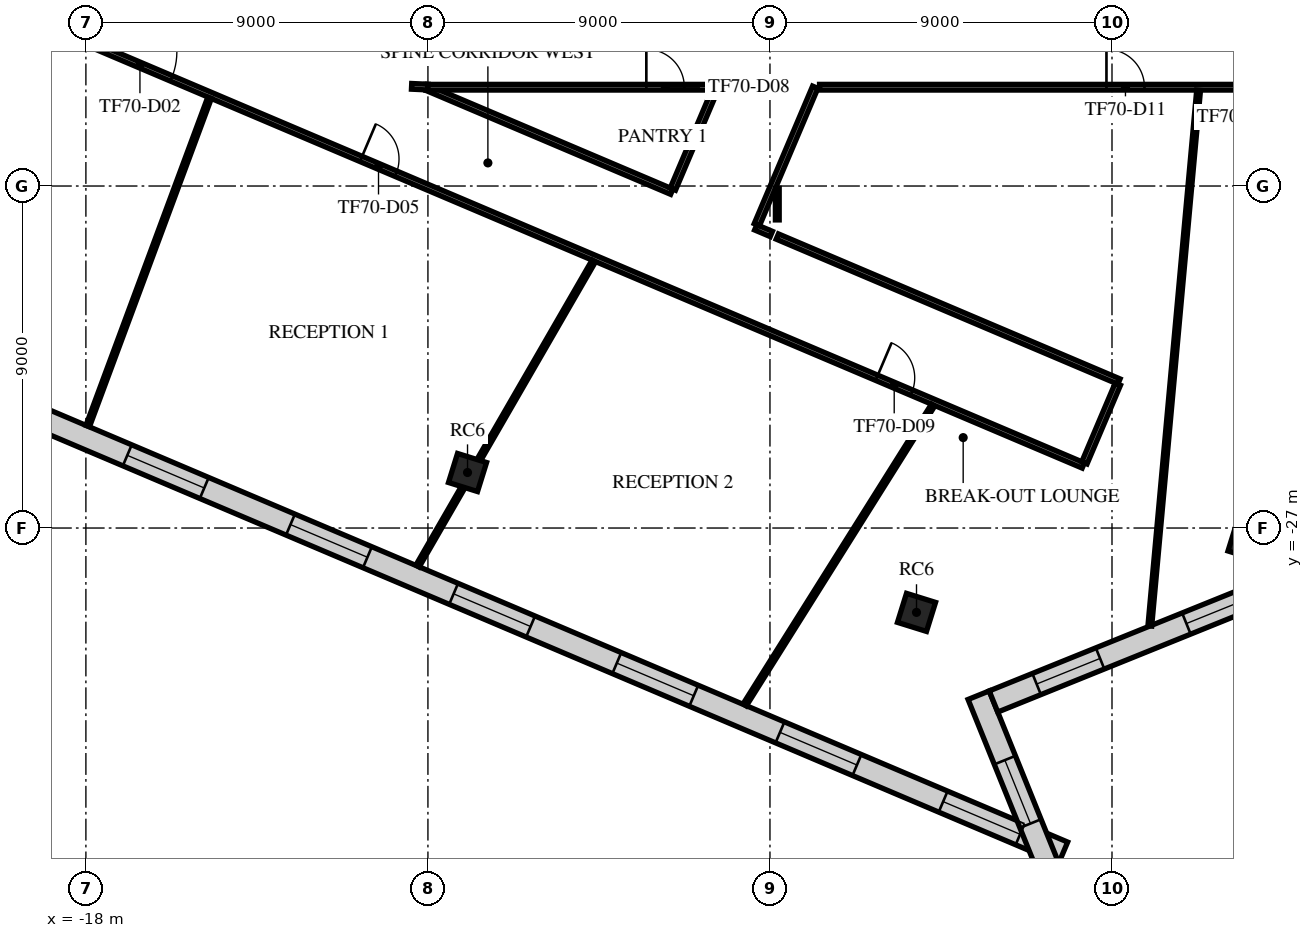
"""IFC4 building model, lengths in metres.
Left out: names, types, materials, properties, quantities, classifications, styles, units other than length and angle.
Written with IfcOpenShell. Run it as: python <this file> out.ifc"""

import sys

from ifc_helpers import new_model, si_unit, direction, frame, frame_2d, origin, origin_2d, place, context, subcontext, project, spatial, rectangle, extrude, element, fill, save


model = new_model("IFC4")
c1 = context("Model", 3, precision=1e-05, world=origin(), true_north=direction((0.0, 1.0)))
c2 = subcontext(c1, "Body", "Model", "MODEL_VIEW")
j1 = project(units=[si_unit("LENGTHUNIT", "METRE"), si_unit("PLANEANGLEUNIT", "RADIAN")], contexts=[c1])
p1 = place(None, origin())
s1 = spatial("IfcSite", under=j1, at=p1, CompositionType="ELEMENT")
p2 = place(p1, origin())
s2 = spatial("IfcBuilding", under=s1, at=p2, CompositionType="ELEMENT")
p3 = place(p2, frame((0.0, 0.0, 300.5)))
s3 = spatial("IfcBuildingStorey", under=s2, at=p3, CompositionType="ELEMENT", Elevation=300.5)
for number, where, z_axis, x_axis in (
    (1, (-7.958, -25.539, 0.0), (0.0, 0.0, 1.0), (0.298, 0.955, 0.0)),
    (2, (3.856, -29.22, 0.0), (0.0, 0.0, 1.0), (0.298, 0.955, 0.0)),
):
    element("IfcColumn", number, at=place(p3, frame(where, z_axis=z_axis, x_axis=x_axis)), inside=s3, PredefinedType="COLUMN", context=c2, shape_type="SweptSolid", body=[
        extrude(rectangle(XDim=0.8, YDim=0.8, at=origin_2d()), origin(), (0.0, 0.0, 1.0), 4.0),
    ])
p4 = place(p3, frame((12.929, -27.144, 0.0), z_axis=(0.0, 0.0, 1.0), x_axis=(0.297503182032, 0.954720826567, 0.0)))
e3 = element("IfcColumn", 3, at=p4, inside=s3, PredefinedType="COLUMN", context=c2, shape_type="SweptSolid", body=[
    extrude(rectangle(XDim=1.4, YDim=1.4, at=origin_2d()), origin(), (0.0, 0.0, 1.0), 4.0),
])
p5 = place(p3, frame((-30.926, -19.138, 0.0), z_axis=(0.0, 0.0, 1.0), x_axis=(0.920504905663, -0.39073100549, 0.0)))
e4 = element("IfcWall", 4, at=p5, inside=s3, PredefinedType="STANDARD", context=c2, shape_type="SweptSolid", body=[
    extrude(rectangle(XDim=41.979, YDim=0.6, at=frame_2d((20.99, 0.0))), origin(), (0.0, 0.0, 1.0), 3.65),
])
p6 = place(p5, frame((1.232, 0.0, 0.9)))
e5 = element("IfcOpeningElement", 5, at=p6, cuts=e4, PredefinedType="OPENING", context=c2, shape_type="SweptSolid", body=[
    extrude(rectangle(XDim=2.2, YDim=2.1, at=frame_2d((1.1, 1.05))), frame((0.0, 0.31, 0.0), z_axis=(0.0, -1.0, 0.0), x_axis=(1.0, 0.0, 0.0)), (0.0, 0.0, 1.0), 0.62),
])
p7 = place(p5, frame((5.896, 0.0, 0.9)))
e6 = element("IfcOpeningElement", 6, at=p7, cuts=e4, PredefinedType="OPENING", context=c2, shape_type="SweptSolid", body=[
    extrude(rectangle(XDim=2.2, YDim=2.1, at=frame_2d((1.1, 1.05))), frame((0.0, 0.31, 0.0), z_axis=(0.0, -1.0, 0.0), x_axis=(1.0, 0.0, 0.0)), (0.0, 0.0, 1.0), 0.62),
])
p8 = place(p5, frame((10.561, 0.0, 0.9)))
e7 = element("IfcOpeningElement", 7, at=p8, cuts=e4, PredefinedType="OPENING", context=c2, shape_type="SweptSolid", body=[
    extrude(rectangle(XDim=2.2, YDim=2.1, at=frame_2d((1.1, 1.05))), frame((0.0, 0.31, 0.0), z_axis=(0.0, -1.0, 0.0), x_axis=(1.0, 0.0, 0.0)), (0.0, 0.0, 1.0), 0.62),
])
p9 = place(p5, frame((15.225, 0.0, 0.9)))
e8 = element("IfcOpeningElement", 8, at=p9, cuts=e4, PredefinedType="OPENING", context=c2, shape_type="SweptSolid", body=[
    extrude(rectangle(XDim=2.2, YDim=2.1, at=frame_2d((1.1, 1.05))), frame((0.0, 0.31, 0.0), z_axis=(0.0, -1.0, 0.0), x_axis=(1.0, 0.0, 0.0)), (0.0, 0.0, 1.0), 0.62),
])
p10 = place(p5, frame((19.89, 0.0, 0.9)))
e9 = element("IfcOpeningElement", 9, at=p10, cuts=e4, PredefinedType="OPENING", context=c2, shape_type="SweptSolid", body=[
    extrude(rectangle(XDim=2.2, YDim=2.1, at=frame_2d((1.1, 1.05))), frame((0.0, 0.31, 0.0), z_axis=(0.0, -1.0, 0.0), x_axis=(1.0, 0.0, 0.0)), (0.0, 0.0, 1.0), 0.62),
])
p11 = place(p5, frame((24.554, 0.0, 0.9)))
e10 = element("IfcOpeningElement", 10, at=p11, cuts=e4, PredefinedType="OPENING", context=c2, shape_type="SweptSolid", body=[
    extrude(rectangle(XDim=2.2, YDim=2.1, at=frame_2d((1.1, 1.05))), frame((0.0, 0.31, 0.0), z_axis=(0.0, -1.0, 0.0), x_axis=(1.0, 0.0, 0.0)), (0.0, 0.0, 1.0), 0.62),
])
p12 = place(p5, frame((29.218, 0.0, 0.9)))
e11 = element("IfcOpeningElement", 11, at=p12, cuts=e4, PredefinedType="OPENING", context=c2, shape_type="SweptSolid", body=[
    extrude(rectangle(XDim=2.2, YDim=2.1, at=frame_2d((1.1, 1.05))), frame((0.0, 0.31, 0.0), z_axis=(0.0, -1.0, 0.0), x_axis=(1.0, 0.0, 0.0)), (0.0, 0.0, 1.0), 0.62),
])
p13 = place(p5, frame((33.883, 0.0, 0.9)))
e12 = element("IfcOpeningElement", 12, at=p13, cuts=e4, PredefinedType="OPENING", context=c2, shape_type="SweptSolid", body=[
    extrude(rectangle(XDim=2.2, YDim=2.1, at=frame_2d((1.1, 1.05))), frame((0.0, 0.31, 0.0), z_axis=(0.0, -1.0, 0.0), x_axis=(1.0, 0.0, 0.0)), (0.0, 0.0, 1.0), 0.62),
])
p14 = place(p5, frame((38.547, 0.0, 0.9)))
e13 = element("IfcOpeningElement", 13, at=p14, cuts=e4, PredefinedType="OPENING", context=c2, shape_type="SweptSolid", body=[
    extrude(rectangle(XDim=2.2, YDim=2.1, at=frame_2d((1.1, 1.05))), frame((0.0, 0.31, 0.0), z_axis=(0.0, -1.0, 0.0), x_axis=(1.0, 0.0, 0.0)), (0.0, 0.0, 1.0), 0.62),
])
p15 = place(p3, frame((7.321, -35.929, 0.0), z_axis=(0.0, 0.0, 1.0), x_axis=(-0.374593593988, 0.927189106571, 0.0)))
e14 = element("IfcWall", 14, at=p15, inside=s3, PredefinedType="STANDARD", context=c2, shape_type="SweptSolid", body=[
    extrude(rectangle(XDim=4.885, YDim=0.6, at=frame_2d((2.443, 0.0))), origin(), (0.0, 0.0, 1.0), 3.65),
])
p16 = place(p15, frame((1.243, 0.0, 0.9)))
e15 = element("IfcOpeningElement", 15, at=p16, cuts=e14, PredefinedType="OPENING", context=c2, shape_type="SweptSolid", body=[
    extrude(rectangle(XDim=1.8, YDim=2.1, at=frame_2d((0.9, 1.05))), frame((0.0, 0.31, 0.0), z_axis=(0.0, -1.0, 0.0), x_axis=(1.0, 0.0, 0.0)), (0.0, 0.0, 1.0), 0.62),
])
p17 = place(p3, frame((5.881, -31.565, 0.0), z_axis=(0.0, 0.0, 1.0), x_axis=(0.927187551636, 0.37459744272, 0.0)))
e16 = element("IfcWall", 16, at=p17, inside=s3, PredefinedType="STANDARD", context=c2, shape_type="SweptSolid", body=[
    extrude(rectangle(XDim=8.5, YDim=0.6, at=frame_2d((4.25, 0.0))), origin(), (0.0, 0.0, 1.0), 3.65),
])
p18 = place(p17, frame((1.225, 0.0, 0.9)))
e17 = element("IfcOpeningElement", 17, at=p18, cuts=e16, PredefinedType="OPENING", context=c2, shape_type="SweptSolid", body=[
    extrude(rectangle(XDim=1.8, YDim=2.1, at=frame_2d((0.9, 1.05))), frame((0.0, 0.31, 0.0), z_axis=(0.0, -1.0, 0.0), x_axis=(1.0, 0.0, 0.0)), (0.0, 0.0, 1.0), 0.62),
])
p19 = place(p17, frame((5.475, 0.0, 0.9)))
e18 = element("IfcOpeningElement", 18, at=p19, cuts=e16, PredefinedType="OPENING", context=c2, shape_type="SweptSolid", body=[
    extrude(rectangle(XDim=1.8, YDim=2.1, at=frame_2d((0.9, 1.05))), frame((0.0, 0.31, 0.0), z_axis=(0.0, -1.0, 0.0), x_axis=(1.0, 0.0, 0.0)), (0.0, 0.0, 1.0), 0.62),
])
p20 = place(p3, frame((-23.896, -11.711, 0.0), z_axis=(0.0, 0.0, 1.0), x_axis=(0.920507643781, -0.390724554821, 0.0)))
e19 = element("IfcWall", 19, at=p20, inside=s3, PredefinedType="PARTITIONING", context=c2, shape_type="SweptSolid", body=[
    extrude(rectangle(XDim=34.917, YDim=0.15, at=frame_2d((17.458, 0.0))), origin(), (0.0, 0.0, 1.0), 3.25),
])
p21 = place(p20, frame((7.05, 0.0, 0.0)))
e20 = element("IfcOpeningElement", 20, at=p21, cuts=e19, PredefinedType="OPENING", context=c2, shape_type="SweptSolid", body=[
    extrude(rectangle(XDim=1.8, YDim=2.1, at=frame_2d((0.9, 1.05))), frame((0.0, 0.085, 0.0), z_axis=(0.0, -1.0, 0.0), x_axis=(1.0, 0.0, 0.0)), (0.0, 0.0, 1.0), 0.17),
])
p22 = place(p20, frame((14.27, 0.0, 0.0)))
e21 = element("IfcOpeningElement", 21, at=p22, cuts=e19, PredefinedType="OPENING", context=c2, shape_type="SweptSolid", body=[
    extrude(rectangle(XDim=1.0, YDim=2.1, at=frame_2d((0.5, 1.05))), frame((0.0, 0.085, 0.0), z_axis=(0.0, -1.0, 0.0), x_axis=(1.0, 0.0, 0.0)), (0.0, 0.0, 1.0), 0.17),
])
p23 = place(p20, frame((29.011, 0.0, 0.0)))
e22 = element("IfcOpeningElement", 22, at=p23, cuts=e19, PredefinedType="OPENING", context=c2, shape_type="SweptSolid", body=[
    extrude(rectangle(XDim=1.0, YDim=2.1, at=frame_2d((0.5, 1.05))), frame((0.0, 0.085, 0.0), z_axis=(0.0, -1.0, 0.0), x_axis=(1.0, 0.0, 0.0)), (0.0, 0.0, 1.0), 0.17),
])
p24 = place(p3, frame((-9.054, -15.404, 0.0), z_axis=(0.0, 0.0, 1.0), x_axis=(0.920529927063, -0.390672053495, 0.0)))
e23 = element("IfcWall", 23, at=p24, inside=s3, PredefinedType="PARTITIONING", context=c2, shape_type="SweptSolid", body=[
    extrude(rectangle(XDim=7.029, YDim=0.15, at=frame_2d((3.514, 0.0))), origin(), (0.0, 0.0, 1.0), 3.25),
])
p25 = place(p3, frame((-9.053, -15.4, 0.0), z_axis=(0.0, 0.0, 1.0), x_axis=(1.0, 0.0, 0.0)))
e24 = element("IfcWall", 24, at=p25, inside=s3, PredefinedType="PARTITIONING", context=c2, shape_type="SweptSolid", body=[
    extrude(rectangle(XDim=7.636, YDim=0.15, at=frame_2d((3.818, 0.0))), origin(), (0.0, 0.0, 1.0), 3.25),
])
p26 = place(p25, frame((5.8, 0.0, 0.0)))
e25 = element("IfcOpeningElement", 25, at=p26, cuts=e24, PredefinedType="OPENING", context=c2, shape_type="SweptSolid", body=[
    extrude(rectangle(XDim=1.0, YDim=2.1, at=frame_2d((0.5, 1.05))), frame((0.0, 0.085, 0.0), z_axis=(0.0, -1.0, 0.0), x_axis=(1.0, 0.0, 0.0)), (0.0, 0.0, 1.0), 0.17),
])
p27 = place(p3, frame((-8.996, -15.397, 0.0), z_axis=(0.0, 0.0, 1.0), x_axis=(-0.998938201598, 0.046070265765, 0.0)))
e26 = element("IfcWall", 26, at=p27, inside=s3, PredefinedType="PARTITIONING", context=c2, shape_type="SweptSolid", body=[
    extrude(rectangle(XDim=0.435, YDim=0.15, at=frame_2d((0.217, 0.0))), origin(), (0.0, 0.0, 1.0), 3.65),
])
p28 = place(p3, frame((-2.555, -18.081, 0.0), z_axis=(0.0, 0.0, 1.0), x_axis=(0.39066407996, 0.920533310983, 0.0)))
e27 = element("IfcWall", 27, at=p28, inside=s3, PredefinedType="PARTITIONING", context=c2, shape_type="SweptSolid", body=[
    extrude(rectangle(XDim=2.799, YDim=0.15, at=frame_2d((1.399, 0.0))), origin(), (0.0, 0.0, 1.0), 3.25),
])
p29 = place(p3, frame((-0.375, -19.088, 0.0), z_axis=(0.0, 0.0, 1.0), x_axis=(0.920778367596, -0.390086141471, 0.0)))
e28 = element("IfcWall", 28, at=p29, inside=s3, PredefinedType="PARTITIONING", context=c2, shape_type="SweptSolid", body=[
    extrude(rectangle(XDim=0.446, YDim=0.15, at=frame_2d((0.223, 0.0))), origin(), (0.0, 0.0, 1.0), 3.65),
])
p30 = place(p3, frame((-0.346, -19.019, 0.0), z_axis=(0.0, 0.0, 1.0), x_axis=(0.390836874274, 0.920459959861, 0.0)))
e29 = element("IfcWall", 29, at=p30, inside=s3, PredefinedType="PARTITIONING", context=c2, shape_type="SweptSolid", body=[
    extrude(rectangle(XDim=3.932, YDim=0.15, at=frame_2d((1.966, 0.0))), origin(), (0.0, 0.0, 1.0), 3.65),
])
p31 = place(p3, frame((0.193, -19.329, 0.0), z_axis=(0.0, 0.0, 1.0), x_axis=(0.92050877494, -0.390721889914, 0.0)))
e30 = element("IfcWall", 30, at=p31, inside=s3, PredefinedType="PARTITIONING", context=c2, shape_type="SweptSolid", body=[
    extrude(rectangle(XDim=9.766, YDim=0.15, at=frame_2d((4.883, 0.0))), origin(), (0.0, 0.0, 1.0), 3.25),
])
p32 = place(p3, frame((1.304, -15.4, 0.0), z_axis=(0.0, 0.0, 1.0), x_axis=(1.0, 0.0, 0.0)))
e31 = element("IfcWall", 31, at=p32, inside=s3, PredefinedType="PARTITIONING", context=c2, shape_type="SweptSolid", body=[
    extrude(rectangle(XDim=13.446, YDim=0.15, at=frame_2d((6.723, 0.0))), origin(), (0.0, 0.0, 1.0), 3.25),
])
p33 = place(p32, frame((7.55, 0.0, 0.0)))
e32 = element("IfcOpeningElement", 32, at=p33, cuts=e31, PredefinedType="OPENING", context=c2, shape_type="SweptSolid", body=[
    extrude(rectangle(XDim=1.0, YDim=2.1, at=frame_2d((0.5, 1.05))), frame((0.0, 0.085, 0.0), z_axis=(0.0, -1.0, 0.0), x_axis=(1.0, 0.0, 0.0)), (0.0, 0.0, 1.0), 0.17),
])
p34 = place(p32, frame((11.278, 0.0, 0.0)))
e33 = element("IfcOpeningElement", 33, at=p34, cuts=e31, PredefinedType="OPENING", context=c2, shape_type="SweptSolid", body=[
    extrude(rectangle(XDim=1.0, YDim=2.1, at=frame_2d((0.5, 1.05))), frame((0.0, 0.085, 0.0), z_axis=(0.0, -1.0, 0.0), x_axis=(1.0, 0.0, 0.0)), (0.0, 0.0, 1.0), 0.17),
])
p35 = place(p3, frame((8.274, -25.285, 0.0), z_axis=(0.0, 0.0, 1.0), x_axis=(0.390878666815, 0.920442213194, 0.0)))
e34 = element("IfcWall", 34, at=p35, inside=s3, PredefinedType="PARTITIONING", context=c2, shape_type="SweptSolid", body=[
    extrude(rectangle(XDim=2.25, YDim=0.15, at=frame_2d((1.125, 0.0))), origin(), (0.0, 0.0, 1.0), 3.25),
])
p36 = place(p3, frame((-17.952, -24.317, 0.0), z_axis=(0.0, 0.0, 1.0), x_axis=(0.348014202779, 0.937489261093, 0.0)))
e35 = element("IfcWall", 35, at=p36, inside=s3, PredefinedType="PARTITIONING", context=c2, shape_type="SweptSolid", body=[
    extrude(rectangle(XDim=9.213, YDim=0.1, at=frame_2d((4.606, 0.0))), origin(), (0.0, 0.0, 1.0), 3.25),
])
p37 = place(p3, frame((-9.273, -28.001, 0.0), z_axis=(0.0, 0.0, 1.0), x_axis=(0.500153880086, 0.865936542845, 0.0)))
e36 = element("IfcWall", 36, at=p37, inside=s3, PredefinedType="PARTITIONING", context=c2, shape_type="SweptSolid", body=[
    extrude(rectangle(XDim=2.4, YDim=0.1, at=frame_2d((1.2, 0.0))), origin(), (0.0, 0.0, 1.0), 3.65),
])
p38 = place(p3, frame((-7.662, -25.212, 0.0), z_axis=(0.0, 0.0, 1.0), x_axis=(0.500102086133, 0.865966456305, 0.0)))
e37 = element("IfcWall", 37, at=p38, inside=s3, PredefinedType="PARTITIONING", context=c2, shape_type="SweptSolid", body=[
    extrude(rectangle(XDim=6.049, YDim=0.1, at=frame_2d((3.024, 0.0))), origin(), (0.0, 0.0, 1.0), 3.25),
])
p39 = place(p3, frame((-0.665, -31.655, 0.0), z_axis=(0.0, 0.0, 1.0), x_axis=(0.531957386579, 0.846771125431, 0.0)))
e38 = element("IfcWall", 38, at=p39, inside=s3, PredefinedType="PARTITIONING", context=c2, shape_type="SweptSolid", body=[
    extrude(rectangle(XDim=9.316, YDim=0.1, at=frame_2d((4.658, 0.0))), origin(), (0.0, 0.0, 1.0), 3.25),
])
p40 = place(p3, frame((0.193, -18.892, 0.0), z_axis=(0.0, 0.0, 1.0), x_axis=(0.0, 1.0, 0.0)))
e39 = element("IfcWall", 39, at=p40, inside=s3, PredefinedType="PARTITIONING", context=c2, shape_type="SweptSolid", body=[
    extrude(rectangle(XDim=0.833, YDim=0.1, at=frame_2d((0.416, 0.0))), origin(), (0.0, 0.0, 1.0), 3.65),
])
p41 = place(p3, frame((9.995, -29.577, 0.0), z_axis=(0.0, 0.0, 1.0), x_axis=(0.090666368484, 0.995881323063, 0.0)))
e40 = element("IfcWall", 40, at=p41, inside=s3, PredefinedType="PARTITIONING", context=c2, shape_type="SweptSolid", body=[
    extrude(rectangle(XDim=14.156, YDim=0.1, at=frame_2d((7.078, 0.0))), origin(), (0.0, 0.0, 1.0), 3.65),
])
p42 = place(p9, origin())
e41 = element("IfcWindow", 41, at=p42, inside=s3, PartitioningType="SINGLE_PANEL", PredefinedType="WINDOW", context=c2, shape_type="SweptSolid", body=[
    extrude(rectangle(XDim=2.2, YDim=2.1, at=frame_2d((1.1, 1.05))), frame((0.0, 0.03, 0.0), z_axis=(0.0, -1.0, 0.0), x_axis=(1.0, 0.0, 0.0)), (0.0, 0.0, 1.0), 0.06),
])
fill(e8, e41)
p43 = place(p10, origin())
e42 = element("IfcWindow", 42, at=p43, inside=s3, PartitioningType="SINGLE_PANEL", PredefinedType="WINDOW", context=c2, shape_type="SweptSolid", body=[
    extrude(rectangle(XDim=2.2, YDim=2.1, at=frame_2d((1.1, 1.05))), frame((0.0, 0.03, 0.0), z_axis=(0.0, -1.0, 0.0), x_axis=(1.0, 0.0, 0.0)), (0.0, 0.0, 1.0), 0.06),
])
fill(e9, e42)
p44 = place(p11, origin())
e43 = element("IfcWindow", 43, at=p44, inside=s3, PartitioningType="SINGLE_PANEL", PredefinedType="WINDOW", context=c2, shape_type="SweptSolid", body=[
    extrude(rectangle(XDim=2.2, YDim=2.1, at=frame_2d((1.1, 1.05))), frame((0.0, 0.03, 0.0), z_axis=(0.0, -1.0, 0.0), x_axis=(1.0, 0.0, 0.0)), (0.0, 0.0, 1.0), 0.06),
])
fill(e10, e43)
p45 = place(p12, origin())
e44 = element("IfcWindow", 44, at=p45, inside=s3, PartitioningType="SINGLE_PANEL", PredefinedType="WINDOW", context=c2, shape_type="SweptSolid", body=[
    extrude(rectangle(XDim=2.2, YDim=2.1, at=frame_2d((1.1, 1.05))), frame((0.0, 0.03, 0.0), z_axis=(0.0, -1.0, 0.0), x_axis=(1.0, 0.0, 0.0)), (0.0, 0.0, 1.0), 0.06),
])
fill(e11, e44)
p46 = place(p13, origin())
e45 = element("IfcWindow", 45, at=p46, inside=s3, PartitioningType="SINGLE_PANEL", PredefinedType="WINDOW", context=c2, shape_type="SweptSolid", body=[
    extrude(rectangle(XDim=2.2, YDim=2.1, at=frame_2d((1.1, 1.05))), frame((0.0, 0.03, 0.0), z_axis=(0.0, -1.0, 0.0), x_axis=(1.0, 0.0, 0.0)), (0.0, 0.0, 1.0), 0.06),
])
fill(e12, e45)
p47 = place(p14, origin())
e46 = element("IfcWindow", 46, at=p47, inside=s3, PartitioningType="SINGLE_PANEL", PredefinedType="WINDOW", context=c2, shape_type="SweptSolid", body=[
    extrude(rectangle(XDim=2.2, YDim=2.1, at=frame_2d((1.1, 1.05))), frame((0.0, 0.03, 0.0), z_axis=(0.0, -1.0, 0.0), x_axis=(1.0, 0.0, 0.0)), (0.0, 0.0, 1.0), 0.06),
])
fill(e13, e46)
p48 = place(p16, origin())
e47 = element("IfcWindow", 47, at=p48, inside=s3, PartitioningType="SINGLE_PANEL", PredefinedType="WINDOW", context=c2, shape_type="SweptSolid", body=[
    extrude(rectangle(XDim=1.8, YDim=2.1, at=frame_2d((0.9, 1.05))), frame((0.0, 0.03, 0.0), z_axis=(0.0, -1.0, 0.0), x_axis=(1.0, 0.0, 0.0)), (0.0, 0.0, 1.0), 0.06),
])
fill(e15, e47)
p49 = place(p18, origin())
e48 = element("IfcWindow", 48, at=p49, inside=s3, PartitioningType="SINGLE_PANEL", PredefinedType="WINDOW", context=c2, shape_type="SweptSolid", body=[
    extrude(rectangle(XDim=1.8, YDim=2.1, at=frame_2d((0.9, 1.05))), frame((0.0, 0.03, 0.0), z_axis=(0.0, -1.0, 0.0), x_axis=(1.0, 0.0, 0.0)), (0.0, 0.0, 1.0), 0.06),
])
fill(e17, e48)
p50 = place(p19, origin())
e49 = element("IfcWindow", 49, at=p50, inside=s3, PartitioningType="SINGLE_PANEL", PredefinedType="WINDOW", context=c2, shape_type="SweptSolid", body=[
    extrude(rectangle(XDim=1.8, YDim=2.1, at=frame_2d((0.9, 1.05))), frame((0.0, 0.03, 0.0), z_axis=(0.0, -1.0, 0.0), x_axis=(1.0, 0.0, 0.0)), (0.0, 0.0, 1.0), 0.06),
])
fill(e18, e49)
p51 = place(p21, frame((1.8, 0.0, 0.0), z_axis=(0.0, 0.0, 1.0), x_axis=(-1.0, 0.0, 0.0)))
e50 = element("IfcDoor", 50, at=p51, inside=s3, OperationType="DOUBLE_DOOR_SINGLE_SWING", PredefinedType="DOOR", context=c2, shape_type="SweptSolid", body=[
    extrude(rectangle(XDim=1.8, YDim=2.1, at=frame_2d((0.9, 1.05))), frame((0.0, 0.025, 0.0), z_axis=(0.0, -1.0, 0.0), x_axis=(1.0, 0.0, 0.0)), (0.0, 0.0, 1.0), 0.05),
])
fill(e20, e50)
p52 = place(p22, frame((1.0, 0.0, 0.0), z_axis=(0.0, 0.0, 1.0), x_axis=(-1.0, 0.0, 0.0)))
e51 = element("IfcDoor", 51, at=p52, inside=s3, OperationType="SINGLE_SWING_RIGHT", PredefinedType="DOOR", context=c2, shape_type="SweptSolid", body=[
    extrude(rectangle(XDim=1.0, YDim=2.1, at=frame_2d((0.5, 1.05))), frame((0.0, 0.025, 0.0), z_axis=(0.0, -1.0, 0.0), x_axis=(1.0, 0.0, 0.0)), (0.0, 0.0, 1.0), 0.05),
])
fill(e21, e51)
p53 = place(p26, frame((1.0, 0.0, 0.0), z_axis=(0.0, 0.0, 1.0), x_axis=(-1.0, 0.0, 0.0)))
e52 = element("IfcDoor", 52, at=p53, inside=s3, OperationType="SINGLE_SWING_RIGHT", PredefinedType="DOOR", context=c2, shape_type="SweptSolid", body=[
    extrude(rectangle(XDim=1.0, YDim=2.1, at=frame_2d((0.5, 1.05))), frame((0.0, 0.025, 0.0), z_axis=(0.0, -1.0, 0.0), x_axis=(1.0, 0.0, 0.0)), (0.0, 0.0, 1.0), 0.05),
])
fill(e25, e52)
p54 = place(p23, frame((1.0, 0.0, 0.0), z_axis=(0.0, 0.0, 1.0), x_axis=(-1.0, 0.0, 0.0)))
e53 = element("IfcDoor", 53, at=p54, inside=s3, OperationType="SINGLE_SWING_LEFT", PredefinedType="DOOR", context=c2, shape_type="SweptSolid", body=[
    extrude(rectangle(XDim=1.0, YDim=2.1, at=frame_2d((0.5, 1.05))), frame((0.0, 0.025, 0.0), z_axis=(0.0, -1.0, 0.0), x_axis=(1.0, 0.0, 0.0)), (0.0, 0.0, 1.0), 0.05),
])
fill(e22, e53)
p55 = place(p33, frame((1.0, 0.0, 0.0), z_axis=(0.0, 0.0, 1.0), x_axis=(-1.0, 0.0, 0.0)))
e54 = element("IfcDoor", 54, at=p55, inside=s3, OperationType="SINGLE_SWING_RIGHT", PredefinedType="DOOR", context=c2, shape_type="SweptSolid", body=[
    extrude(rectangle(XDim=1.0, YDim=2.1, at=frame_2d((0.5, 1.05))), frame((0.0, 0.025, 0.0), z_axis=(0.0, -1.0, 0.0), x_axis=(1.0, 0.0, 0.0)), (0.0, 0.0, 1.0), 0.05),
])
fill(e32, e54)
save(model, sys.argv[1])
